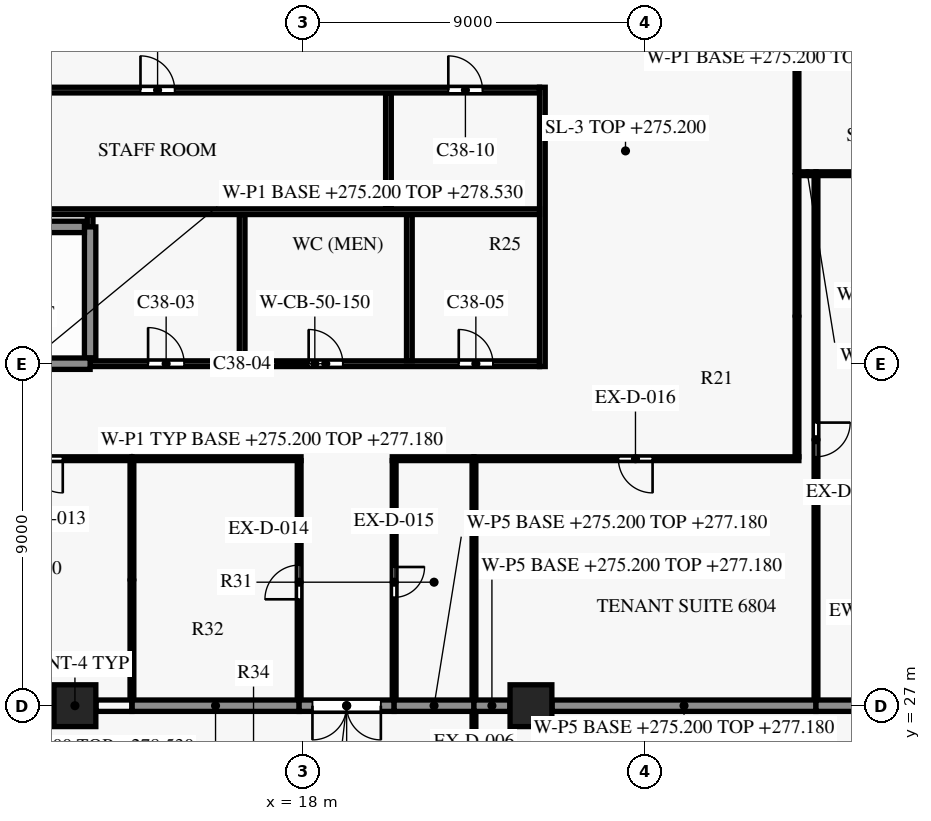
"""IFC4 building model, lengths in metres.
Left out: names, types, materials, properties, quantities, classifications, styles, units other than length and angle.
Written with IfcOpenShell. Run it as: python <this file> out.ifc"""

import sys

from ifc_helpers import new_model, si_unit, direction, frame, frame_2d, origin, origin_2d, place, context, subcontext, project, spatial, rectangle, extrude, element, fill, save


model = new_model("IFC4")
c1 = context("Model", 3, precision=1e-05, world=origin(), true_north=direction((0.0, 1.0)))
c2 = subcontext(c1, "Body", "Model", "MODEL_VIEW")
j1 = project(units=[si_unit("LENGTHUNIT", "METRE"), si_unit("PLANEANGLEUNIT", "RADIAN")], contexts=[c1])
p1 = place(None, origin())
s1 = spatial("IfcSite", under=j1, at=p1, CompositionType="ELEMENT")
p2 = place(p1, origin())
s2 = spatial("IfcBuilding", under=s1, at=p2, CompositionType="ELEMENT")
p3 = place(p2, frame((0.0, 0.0, 275.2)))
s3 = spatial("IfcBuildingStorey", under=s2, at=p3, CompositionType="ELEMENT", Elevation=275.2)
for number, where, z_axis, x_axis in (
    (1, (12.0, 27.0, 0.0), (0.0, 0.0, 1.0), (1.0, 0.0, 0.0)),
    (2, (24.0, 27.0, 0.0), (0.0, 0.0, 1.0), (1.0, 0.0, 0.0)),
):
    element("IfcColumn", number, at=place(p3, frame(where, z_axis=z_axis, x_axis=x_axis)), inside=s3, PredefinedType="COLUMN", context=c2, shape_type="SweptSolid", body=[
        extrude(rectangle(XDim=1.1, YDim=1.1, at=origin_2d()), origin(), (0.0, 0.0, 1.0), 3.8),
    ])
p4 = place(p3, frame((12.4, 36.0, 0.0), z_axis=(0.0, 0.0, 1.0), x_axis=(1.0, 0.0, 0.0)))
e3 = element("IfcWall", 3, at=p4, inside=s3, PredefinedType="SHEAR", context=c2, shape_type="SweptSolid", body=[
    extrude(rectangle(XDim=11.825, YDim=0.15, at=frame_2d((5.913, 0.0))), origin(), (0.0, 0.0, 1.0), 3.5),
])
p5 = place(p4, frame((1.525, 0.0, 0.0)))
e4 = element("IfcOpeningElement", 4, at=p5, cuts=e3, PredefinedType="OPENING", context=c2, shape_type="SweptSolid", body=[
    extrude(rectangle(XDim=0.95, YDim=2.1, at=frame_2d((0.475, 1.05))), frame((0.0, 0.085, 0.0), z_axis=(0.0, -1.0, 0.0), x_axis=(1.0, 0.0, 0.0)), (0.0, 0.0, 1.0), 0.17),
])
p6 = place(p4, frame((5.75, 0.0, 0.0)))
e5 = element("IfcOpeningElement", 5, at=p6, cuts=e3, PredefinedType="OPENING", context=c2, shape_type="SweptSolid", body=[
    extrude(rectangle(XDim=0.9, YDim=2.1, at=frame_2d((0.45, 1.05))), frame((0.0, 0.085, 0.0), z_axis=(0.0, -1.0, 0.0), x_axis=(1.0, 0.0, 0.0)), (0.0, 0.0, 1.0), 0.17),
])
p7 = place(p4, frame((9.7, 0.0, 0.0)))
e6 = element("IfcOpeningElement", 6, at=p7, cuts=e3, PredefinedType="OPENING", context=c2, shape_type="SweptSolid", body=[
    extrude(rectangle(XDim=0.9, YDim=2.1, at=frame_2d((0.45, 1.05))), frame((0.0, 0.085, 0.0), z_axis=(0.0, -1.0, 0.0), x_axis=(1.0, 0.0, 0.0)), (0.0, 0.0, 1.0), 0.17),
])
p8 = place(p3, frame((4.4, 36.0, 0.0), z_axis=(0.0, 0.0, 1.0), x_axis=(1.0, 0.0, 0.0)))
e7 = element("IfcWall", 7, at=p8, inside=s3, PredefinedType="SHEAR", context=c2, shape_type="SweptSolid", body=[
    extrude(rectangle(XDim=8.0, YDim=0.3, at=frame_2d((4.0, 0.0))), origin(), (0.0, 0.0, 1.0), 3.5),
])
p9 = place(p8, frame((0.3, 0.0, 0.0)))
e8 = element("IfcOpeningElement", 8, at=p9, cuts=e7, PredefinedType="OPENING", context=c2, shape_type="SweptSolid", body=[
    extrude(rectangle(XDim=1.5, YDim=2.2, at=frame_2d((0.75, 1.1))), frame((0.0, 0.16, 0.0), z_axis=(0.0, -1.0, 0.0), x_axis=(1.0, 0.0, 0.0)), (0.0, 0.0, 1.0), 0.32),
])
p10 = place(p3, frame((4.55, 39.6, 0.0), z_axis=(0.0, 0.0, 1.0), x_axis=(1.0, 0.0, 0.0)))
e9 = element("IfcWall", 9, at=p10, inside=s3, PredefinedType="SHEAR", context=c2, shape_type="SweptSolid", body=[
    extrude(rectangle(XDim=7.7, YDim=0.3, at=frame_2d((3.85, 0.0))), origin(), (0.0, 0.0, 1.0), 3.5),
])
p11 = place(p3, frame((8.1, 40.0, 0.0), z_axis=(0.0, 0.0, 1.0), x_axis=(1.0, 0.0, 0.0)))
e10 = element("IfcWall", 10, at=p11, inside=s3, PredefinedType="PARTITIONING", context=c2, shape_type="SweptSolid", body=[
    extrude(rectangle(XDim=16.125, YDim=0.15, at=frame_2d((8.062, 0.0))), origin(), (0.0, 0.0, 1.0), 3.35),
])
p12 = place(p3, frame((8.1, 43.2, 0.0), z_axis=(0.0, 0.0, 1.0), x_axis=(1.0, 0.0, 0.0)))
e11 = element("IfcWall", 11, at=p12, inside=s3, PredefinedType="PARTITIONING", context=c2, shape_type="SweptSolid", body=[
    extrude(rectangle(XDim=16.125, YDim=0.15, at=frame_2d((8.062, 0.0))), origin(), (0.0, 0.0, 1.0), 3.35),
])
p13 = place(p12, frame((5.625, 0.0, 0.0)))
e12 = element("IfcOpeningElement", 12, at=p13, cuts=e11, PredefinedType="OPENING", context=c2, shape_type="SweptSolid", body=[
    extrude(rectangle(XDim=0.9, YDim=2.1, at=frame_2d((0.45, 1.05))), frame((0.0, 0.085, 0.0), z_axis=(0.0, -1.0, 0.0), x_axis=(1.0, 0.0, 0.0)), (0.0, 0.0, 1.0), 0.17),
])
p14 = place(p12, frame((13.725, 0.0, 0.0)))
e13 = element("IfcOpeningElement", 13, at=p14, cuts=e11, PredefinedType="OPENING", context=c2, shape_type="SweptSolid", body=[
    extrude(rectangle(XDim=0.9, YDim=2.1, at=frame_2d((0.45, 1.05))), frame((0.0, 0.085, 0.0), z_axis=(0.0, -1.0, 0.0), x_axis=(1.0, 0.0, 0.0)), (0.0, 0.0, 1.0), 0.17),
])
p15 = place(p3, frame((12.4, 39.6, 0.0), z_axis=(0.0, 0.0, 1.0), x_axis=(0.0, 1.0, 0.0)))
e14 = element("IfcWall", 14, at=p15, inside=s3, PredefinedType="PARTITIONING", context=c2, shape_type="SweptSolid", body=[
    extrude(rectangle(XDim=0.325, YDim=0.15, at=frame_2d((0.163, 0.0))), origin(), (0.0, 0.0, 1.0), 3.35),
])
p16 = place(p3, frame((12.4, 36.15, 0.0), z_axis=(0.0, 0.0, 1.0), x_axis=(0.0, 1.0, 0.0)))
e15 = element("IfcWall", 15, at=p16, inside=s3, PredefinedType="SHEAR", context=c2, shape_type="SweptSolid", body=[
    extrude(rectangle(XDim=3.45, YDim=0.3, at=frame_2d((1.725, 0.0))), origin(), (0.0, 0.0, 1.0), 3.5),
])
p17 = place(p3, frame((16.4, 36.075, 0.0), z_axis=(0.0, 0.0, 1.0), x_axis=(0.0, 1.0, 0.0)))
e16 = element("IfcWall", 16, at=p17, inside=s3, PredefinedType="PARTITIONING", context=c2, shape_type="SweptSolid", body=[
    extrude(rectangle(XDim=3.85, YDim=0.15, at=frame_2d((1.925, 0.0))), origin(), (0.0, 0.0, 1.0), 3.35),
])
p18 = place(p3, frame((20.25, 40.075, 0.0), z_axis=(0.0, 0.0, 1.0), x_axis=(0.0, 1.0, 0.0)))
e17 = element("IfcWall", 17, at=p18, inside=s3, PredefinedType="PARTITIONING", context=c2, shape_type="SweptSolid", body=[
    extrude(rectangle(XDim=3.05, YDim=0.15, at=frame_2d((1.525, 0.0))), origin(), (0.0, 0.0, 1.0), 3.35),
])
p19 = place(p3, frame((20.8, 36.075, 0.0), z_axis=(0.0, 0.0, 1.0), x_axis=(0.0, 1.0, 0.0)))
e18 = element("IfcWall", 18, at=p19, inside=s3, PredefinedType="PARTITIONING", context=c2, shape_type="SweptSolid", body=[
    extrude(rectangle(XDim=3.85, YDim=0.15, at=frame_2d((1.925, 0.0))), origin(), (0.0, 0.0, 1.0), 3.35),
])
p20 = place(p3, frame((24.3, 35.925, 0.0), z_axis=(0.0, 0.0, 1.0), x_axis=(0.0, 1.0, 0.0)))
e19 = element("IfcWall", 19, at=p20, inside=s3, PredefinedType="PARTITIONING", context=c2, shape_type="SweptSolid", body=[
    extrude(rectangle(XDim=7.35, YDim=0.15, at=frame_2d((3.675, 0.0))), origin(), (0.0, 0.0, 1.0), 3.35),
])
p21 = place(p3, frame((22.5, 26.83, 0.0), z_axis=(0.0, 0.0, 1.0), x_axis=(0.0, -1.0, 0.0)))
e20 = element("IfcWall", 20, at=p21, inside=s3, PredefinedType="PARTITIONING", context=c2, shape_type="SweptSolid", body=[
    extrude(rectangle(XDim=3.38, YDim=0.1, at=frame_2d((1.69, 0.0))), origin(), (0.0, 0.0, 1.0), 1.98),
])
p22 = place(p21, frame((1.935, 0.0, 0.0)))
e21 = element("IfcOpeningElement", 21, at=p22, cuts=e20, PredefinedType="OPENING", context=c2, shape_type="SweptSolid", body=[
    extrude(rectangle(XDim=0.9, YDim=2.1, at=frame_2d((0.45, 1.05))), frame((0.0, 0.06, 0.0), z_axis=(0.0, -1.0, 0.0), x_axis=(1.0, 0.0, 0.0)), (0.0, 0.0, 1.0), 0.12),
])
p23 = place(p3, frame((10.9, 27.0, 0.0), z_axis=(0.0, 0.0, 1.0), x_axis=(1.0, 0.0, 0.0)))
e22 = element("IfcWall", 22, at=p23, inside=s3, PredefinedType="PARTITIONING", context=c2, shape_type="SweptSolid", body=[
    extrude(rectangle(XDim=0.545, YDim=0.3, at=frame_2d((0.272, 0.0))), origin(), (0.0, 0.0, 1.0), 3.33),
])
p24 = place(p3, frame((12.555, 27.0, 0.0), z_axis=(0.0, 0.0, 1.0), x_axis=(1.0, 0.0, 0.0)))
e23 = element("IfcWall", 23, at=p24, inside=s3, PredefinedType="PARTITIONING", context=c2, shape_type="SweptSolid", body=[
    extrude(rectangle(XDim=0.945, YDim=0.3, at=frame_2d((0.473, 0.0))), origin(), (0.0, 0.0, 1.0), 1.98),
])
p25 = place(p3, frame((13.5, 27.0, 0.0), z_axis=(0.0, 0.0, 1.0), x_axis=(1.0, 0.0, 0.0)))
e24 = element("IfcWall", 24, at=p25, inside=s3, PredefinedType="PARTITIONING", context=c2, shape_type="SweptSolid", body=[
    extrude(rectangle(XDim=4.4, YDim=0.3, at=frame_2d((2.2, 0.0))), origin(), (0.0, 0.0, 1.0), 1.98),
])
p26 = place(p3, frame((20.4, 27.0, 0.0), z_axis=(0.0, 0.0, 1.0), x_axis=(-1.0, 0.0, 0.0)))
e25 = element("IfcWall", 25, at=p26, inside=s3, PredefinedType="PARTITIONING", context=c2, shape_type="SweptSolid", body=[
    extrude(rectangle(XDim=2.5, YDim=0.3, at=frame_2d((1.25, 0.0))), origin(), (0.0, 0.0, 1.0), 2.73),
])
p27 = place(p26, frame((0.35, 0.0, 0.0)))
e26 = element("IfcOpeningElement", 26, at=p27, cuts=e25, PredefinedType="OPENING", context=c2, shape_type="SweptSolid", body=[
    extrude(rectangle(XDim=1.8, YDim=2.1, at=frame_2d((0.9, 1.05))), frame((0.0, 0.16, 0.0), z_axis=(0.0, -1.0, 0.0), x_axis=(1.0, 0.0, 0.0)), (0.0, 0.0, 1.0), 0.32),
])
p28 = place(p3, frame((20.4, 27.0, 0.0), z_axis=(0.0, 0.0, 1.0), x_axis=(1.0, 0.0, 0.0)))
e27 = element("IfcWall", 27, at=p28, inside=s3, PredefinedType="PARTITIONING", context=c2, shape_type="SweptSolid", body=[
    extrude(rectangle(XDim=2.1, YDim=0.3, at=frame_2d((1.05, 0.0))), origin(), (0.0, 0.0, 1.0), 1.98),
])
p29 = place(p3, frame((22.5, 27.0, 0.0), z_axis=(0.0, 0.0, 1.0), x_axis=(1.0, 0.0, 0.0)))
e28 = element("IfcWall", 28, at=p29, inside=s3, PredefinedType="PARTITIONING", context=c2, shape_type="SweptSolid", body=[
    extrude(rectangle(XDim=0.945, YDim=0.3, at=frame_2d((0.473, 0.0))), origin(), (0.0, 0.0, 1.0), 1.98),
])
p30 = place(p3, frame((24.555, 27.0, 0.0), z_axis=(0.0, 0.0, 1.0), x_axis=(1.0, 0.0, 0.0)))
e29 = element("IfcWall", 29, at=p30, inside=s3, PredefinedType="PARTITIONING", context=c2, shape_type="SweptSolid", body=[
    extrude(rectangle(XDim=6.945, YDim=0.3, at=frame_2d((3.473, 0.0))), origin(), (0.0, 0.0, 1.0), 1.98),
])
p31 = place(p3, frame((31.5, 27.0, 0.0), z_axis=(0.0, 0.0, 1.0), x_axis=(1.0, 0.0, 0.0)))
e30 = element("IfcWall", 30, at=p31, inside=s3, PredefinedType="PARTITIONING", context=c2, shape_type="SweptSolid", body=[
    extrude(rectangle(XDim=3.726, YDim=0.3, at=frame_2d((1.863, 0.0))), origin(), (0.0, 0.0, 1.0), 1.98),
])
p32 = place(p3, frame((17.9, 27.17, 0.0), z_axis=(0.0, 0.0, 1.0), x_axis=(0.0, 1.0, 0.0)))
e31 = element("IfcWall", 31, at=p32, inside=s3, PredefinedType="PARTITIONING", context=c2, shape_type="SweptSolid", body=[
    extrude(rectangle(XDim=6.28, YDim=0.1, at=frame_2d((3.14, 0.0))), origin(), (0.0, 0.0, 1.0), 2.73),
])
p33 = place(p32, frame((2.63, 0.0, 0.0)))
e32 = element("IfcOpeningElement", 32, at=p33, cuts=e31, PredefinedType="OPENING", context=c2, shape_type="SweptSolid", body=[
    extrude(rectangle(XDim=0.9, YDim=2.1, at=frame_2d((0.45, 1.05))), frame((0.0, 0.06, 0.0), z_axis=(0.0, -1.0, 0.0), x_axis=(1.0, 0.0, 0.0)), (0.0, 0.0, 1.0), 0.12),
])
p34 = place(p3, frame((13.5, 33.45, 0.0), z_axis=(0.0, 0.0, 1.0), x_axis=(0.0, -1.0, 0.0)))
e33 = element("IfcWall", 33, at=p34, inside=s3, PredefinedType="PARTITIONING", context=c2, shape_type="SweptSolid", body=[
    extrude(rectangle(XDim=6.28, YDim=0.1, at=frame_2d((3.14, 0.0))), origin(), (0.0, 0.0, 1.0), 1.98),
])
p35 = place(p3, frame((20.4, 33.45, 0.0), z_axis=(0.0, 0.0, 1.0), x_axis=(0.0, -1.0, 0.0)))
e34 = element("IfcWall", 34, at=p35, inside=s3, PredefinedType="PARTITIONING", context=c2, shape_type="SweptSolid", body=[
    extrude(rectangle(XDim=6.28, YDim=0.1, at=frame_2d((3.14, 0.0))), origin(), (0.0, 0.0, 1.0), 2.73),
])
p36 = place(p35, frame((2.8, 0.0, 0.0)))
e35 = element("IfcOpeningElement", 35, at=p36, cuts=e34, PredefinedType="OPENING", context=c2, shape_type="SweptSolid", body=[
    extrude(rectangle(XDim=0.8, YDim=2.1, at=frame_2d((0.4, 1.05))), frame((0.0, 0.06, 0.0), z_axis=(0.0, -1.0, 0.0), x_axis=(1.0, 0.0, 0.0)), (0.0, 0.0, 1.0), 0.12),
])
p37 = place(p3, frame((22.5, 33.45, 0.0), z_axis=(0.0, 0.0, 1.0), x_axis=(0.0, -1.0, 0.0)))
e36 = element("IfcWall", 36, at=p37, inside=s3, PredefinedType="PARTITIONING", context=c2, shape_type="SweptSolid", body=[
    extrude(rectangle(XDim=6.28, YDim=0.1, at=frame_2d((3.14, 0.0))), origin(), (0.0, 0.0, 1.0), 1.98),
])
p38 = place(p3, frame((13.5, 33.5, 0.0), z_axis=(0.0, 0.0, 1.0), x_axis=(-1.0, 0.0, 0.0)))
e37 = element("IfcWall", 37, at=p38, inside=s3, PredefinedType="PARTITIONING", context=c2, shape_type="SweptSolid", body=[
    extrude(rectangle(XDim=4.54, YDim=0.1, at=frame_2d((2.27, 0.0))), origin(), (0.0, 0.0, 1.0), 1.98),
])
p39 = place(p38, frame((1.82, 0.0, 0.0)))
e38 = element("IfcOpeningElement", 38, at=p39, cuts=e37, PredefinedType="OPENING", context=c2, shape_type="SweptSolid", body=[
    extrude(rectangle(XDim=0.9, YDim=2.1, at=frame_2d((0.45, 1.05))), frame((0.0, 0.06, 0.0), z_axis=(0.0, -1.0, 0.0), x_axis=(1.0, 0.0, 0.0)), (0.0, 0.0, 1.0), 0.12),
])
p40 = place(p3, frame((17.95, 33.5, 0.0), z_axis=(0.0, 0.0, 1.0), x_axis=(-1.0, 0.0, 0.0)))
e39 = element("IfcWall", 39, at=p40, inside=s3, PredefinedType="PARTITIONING", context=c2, shape_type="SweptSolid", body=[
    extrude(rectangle(XDim=4.45, YDim=0.1, at=frame_2d((2.225, 0.0))), origin(), (0.0, 0.0, 1.0), 1.98),
])
p41 = place(p3, frame((22.5, 33.5, 0.0), z_axis=(0.0, 0.0, 1.0), x_axis=(-1.0, 0.0, 0.0)))
e40 = element("IfcWall", 40, at=p41, inside=s3, PredefinedType="PARTITIONING", context=c2, shape_type="SweptSolid", body=[
    extrude(rectangle(XDim=2.15, YDim=0.1, at=frame_2d((1.075, 0.0))), origin(), (0.0, 0.0, 1.0), 1.98),
])
p42 = place(p3, frame((31.05, 33.5, 0.0), z_axis=(0.0, 0.0, 1.0), x_axis=(-1.0, 0.0, 0.0)))
e41 = element("IfcWall", 41, at=p42, inside=s3, PredefinedType="PARTITIONING", context=c2, shape_type="SweptSolid", body=[
    extrude(rectangle(XDim=8.55, YDim=0.1, at=frame_2d((4.275, 0.0))), origin(), (0.0, 0.0, 1.0), 1.98),
])
p43 = place(p42, frame((3.85, 0.0, 0.0)))
e42 = element("IfcOpeningElement", 42, at=p43, cuts=e41, PredefinedType="OPENING", context=c2, shape_type="SweptSolid", body=[
    extrude(rectangle(XDim=0.9, YDim=2.1, at=frame_2d((0.45, 1.05))), frame((0.0, 0.06, 0.0), z_axis=(0.0, -1.0, 0.0), x_axis=(1.0, 0.0, 0.0)), (0.0, 0.0, 1.0), 0.12),
])
p44 = place(p3, frame((31.0, 40.95, 0.0), z_axis=(0.0, 0.0, 1.0), x_axis=(0.0, -1.0, 0.0)))
e43 = element("IfcWall", 43, at=p44, inside=s3, PredefinedType="PARTITIONING", context=c2, shape_type="SweptSolid", body=[
    extrude(rectangle(XDim=7.4, YDim=0.1, at=frame_2d((3.7, 0.0))), origin(), (0.0, 0.0, 1.0), 2.98),
])
p45 = place(p3, frame((31.5, 40.95, 0.0), z_axis=(0.0, 0.0, 1.0), x_axis=(0.0, -1.0, 0.0)))
e44 = element("IfcWall", 44, at=p45, inside=s3, PredefinedType="PARTITIONING", context=c2, shape_type="SweptSolid", body=[
    extrude(rectangle(XDim=13.78, YDim=0.1, at=frame_2d((6.89, 0.0))), origin(), (0.0, 0.0, 1.0), 1.98),
])
p46 = place(p45, frame((6.5, 0.0, 0.0)))
e45 = element("IfcOpeningElement", 45, at=p46, cuts=e44, PredefinedType="OPENING", context=c2, shape_type="SweptSolid", body=[
    extrude(rectangle(XDim=0.9, YDim=2.1, at=frame_2d((0.45, 1.05))), frame((0.0, 0.06, 0.0), z_axis=(0.0, -1.0, 0.0), x_axis=(1.0, 0.0, 0.0)), (0.0, 0.0, 1.0), 0.12),
])
p47 = place(p3, frame((31.05, 41.0, 0.0), z_axis=(0.0, 0.0, 1.0), x_axis=(1.0, 0.0, 0.0)))
e46 = element("IfcWall", 46, at=p47, inside=s3, PredefinedType="PARTITIONING", context=c2, shape_type="SweptSolid", body=[
    extrude(rectangle(XDim=0.45, YDim=0.1, at=frame_2d((0.225, 0.0))), origin(), (0.0, 0.0, 1.0), 3.33),
])
p48 = place(p3, frame((35.95, 41.0, 0.0), z_axis=(0.0, 0.0, 1.0), x_axis=(-1.0, 0.0, 0.0)))
e47 = element("IfcWall", 47, at=p48, inside=s3, PredefinedType="PARTITIONING", context=c2, shape_type="SweptSolid", body=[
    extrude(rectangle(XDim=4.45, YDim=0.1, at=frame_2d((2.225, 0.0))), origin(), (0.0, 0.0, 1.0), 1.98),
])
p49 = place(p3, frame((31.0, 54.95, 0.0), z_axis=(0.0, 0.0, 1.0), x_axis=(0.0, -1.0, 0.0)))
e48 = element("IfcWall", 48, at=p49, inside=s3, PredefinedType="PARTITIONING", context=c2, shape_type="SweptSolid", body=[
    extrude(rectangle(XDim=13.9, YDim=0.1, at=frame_2d((6.95, 0.0))), origin(), (0.0, 0.0, 1.0), 2.98),
])
p50 = place(p49, frame((6.5, 0.0, 0.0)))
e49 = element("IfcOpeningElement", 49, at=p50, cuts=e48, PredefinedType="OPENING", context=c2, shape_type="SweptSolid", body=[
    extrude(rectangle(XDim=0.9, YDim=2.1, at=frame_2d((0.45, 1.05))), frame((0.0, 0.06, 0.0), z_axis=(0.0, -1.0, 0.0), x_axis=(1.0, 0.0, 0.0)), (0.0, 0.0, 1.0), 0.12),
])
p51 = place(p5, origin())
e50 = element("IfcDoor", 50, at=p51, inside=s3, OperationType="SINGLE_SWING_RIGHT", PredefinedType="DOOR", context=c2, shape_type="SweptSolid", body=[
    extrude(rectangle(XDim=0.95, YDim=2.1, at=frame_2d((0.475, 1.05))), frame((0.0, 0.025, 0.0), z_axis=(0.0, -1.0, 0.0), x_axis=(1.0, 0.0, 0.0)), (0.0, 0.0, 1.0), 0.05),
])
fill(e4, e50)
p52 = place(p6, origin())
e51 = element("IfcDoor", 51, at=p52, inside=s3, OperationType="SINGLE_SWING_LEFT", PredefinedType="DOOR", context=c2, shape_type="SweptSolid", body=[
    extrude(rectangle(XDim=0.9, YDim=2.1, at=frame_2d((0.45, 1.05))), frame((0.0, 0.025, 0.0), z_axis=(0.0, -1.0, 0.0), x_axis=(1.0, 0.0, 0.0)), (0.0, 0.0, 1.0), 0.05),
])
fill(e5, e51)
p53 = place(p7, origin())
e52 = element("IfcDoor", 52, at=p53, inside=s3, OperationType="SINGLE_SWING_RIGHT", PredefinedType="DOOR", context=c2, shape_type="SweptSolid", body=[
    extrude(rectangle(XDim=0.9, YDim=2.1, at=frame_2d((0.45, 1.05))), frame((0.0, 0.025, 0.0), z_axis=(0.0, -1.0, 0.0), x_axis=(1.0, 0.0, 0.0)), (0.0, 0.0, 1.0), 0.05),
])
fill(e6, e52)
p54 = place(p13, origin())
e53 = element("IfcDoor", 53, at=p54, inside=s3, OperationType="SINGLE_SWING_RIGHT", PredefinedType="DOOR", context=c2, shape_type="SweptSolid", body=[
    extrude(rectangle(XDim=0.9, YDim=2.1, at=frame_2d((0.45, 1.05))), frame((0.0, 0.025, 0.0), z_axis=(0.0, -1.0, 0.0), x_axis=(1.0, 0.0, 0.0)), (0.0, 0.0, 1.0), 0.05),
])
fill(e12, e53)
p55 = place(p14, origin())
e54 = element("IfcDoor", 54, at=p55, inside=s3, OperationType="SINGLE_SWING_LEFT", PredefinedType="DOOR", context=c2, shape_type="SweptSolid", body=[
    extrude(rectangle(XDim=0.9, YDim=2.1, at=frame_2d((0.45, 1.05))), frame((0.0, 0.025, 0.0), z_axis=(0.0, -1.0, 0.0), x_axis=(1.0, 0.0, 0.0)), (0.0, 0.0, 1.0), 0.05),
])
fill(e13, e54)
p56 = place(p39, origin())
e55 = element("IfcDoor", 55, at=p56, inside=s3, OperationType="SINGLE_SWING_LEFT", PredefinedType="DOOR", context=c2, shape_type="SweptSolid", body=[
    extrude(rectangle(XDim=0.9, YDim=2.1, at=frame_2d((0.45, 1.05))), frame((0.0, 0.025, 0.0), z_axis=(0.0, -1.0, 0.0), x_axis=(1.0, 0.0, 0.0)), (0.0, 0.0, 1.0), 0.05),
])
fill(e38, e55)
p57 = place(p33, origin())
e56 = element("IfcDoor", 56, at=p57, inside=s3, OperationType="SINGLE_SWING_RIGHT", PredefinedType="DOOR", context=c2, shape_type="SweptSolid", body=[
    extrude(rectangle(XDim=0.9, YDim=2.1, at=frame_2d((0.45, 1.05))), frame((0.0, 0.025, 0.0), z_axis=(0.0, -1.0, 0.0), x_axis=(1.0, 0.0, 0.0)), (0.0, 0.0, 1.0), 0.05),
])
fill(e32, e56)
p58 = place(p36, origin())
e57 = element("IfcDoor", 57, at=p58, inside=s3, OperationType="SINGLE_SWING_LEFT", PredefinedType="DOOR", context=c2, shape_type="SweptSolid", body=[
    extrude(rectangle(XDim=0.8, YDim=2.1, at=frame_2d((0.4, 1.05))), frame((0.0, 0.025, 0.0), z_axis=(0.0, -1.0, 0.0), x_axis=(1.0, 0.0, 0.0)), (0.0, 0.0, 1.0), 0.05),
])
fill(e35, e57)
p59 = place(p43, origin())
e58 = element("IfcDoor", 58, at=p59, inside=s3, OperationType="SINGLE_SWING_LEFT", PredefinedType="DOOR", context=c2, shape_type="SweptSolid", body=[
    extrude(rectangle(XDim=0.9, YDim=2.1, at=frame_2d((0.45, 1.05))), frame((0.0, 0.025, 0.0), z_axis=(0.0, -1.0, 0.0), x_axis=(1.0, 0.0, 0.0)), (0.0, 0.0, 1.0), 0.05),
])
fill(e42, e58)
p60 = place(p46, origin())
e59 = element("IfcDoor", 59, at=p60, inside=s3, OperationType="SINGLE_SWING_LEFT", PredefinedType="DOOR", context=c2, shape_type="SweptSolid", body=[
    extrude(rectangle(XDim=0.9, YDim=2.1, at=frame_2d((0.45, 1.05))), frame((0.0, 0.025, 0.0), z_axis=(0.0, -1.0, 0.0), x_axis=(1.0, 0.0, 0.0)), (0.0, 0.0, 1.0), 0.05),
])
fill(e45, e59)
p61 = place(p27, origin())
e60 = element("IfcDoor", 60, at=p61, inside=s3, OperationType="DOUBLE_DOOR_SINGLE_SWING", PredefinedType="DOOR", context=c2, shape_type="SweptSolid", body=[
    extrude(rectangle(XDim=1.8, YDim=2.1, at=frame_2d((0.9, 1.05))), frame((0.0, 0.025, 0.0), z_axis=(0.0, -1.0, 0.0), x_axis=(1.0, 0.0, 0.0)), (0.0, 0.0, 1.0), 0.05),
])
fill(e26, e60)
save(model, sys.argv[1])
